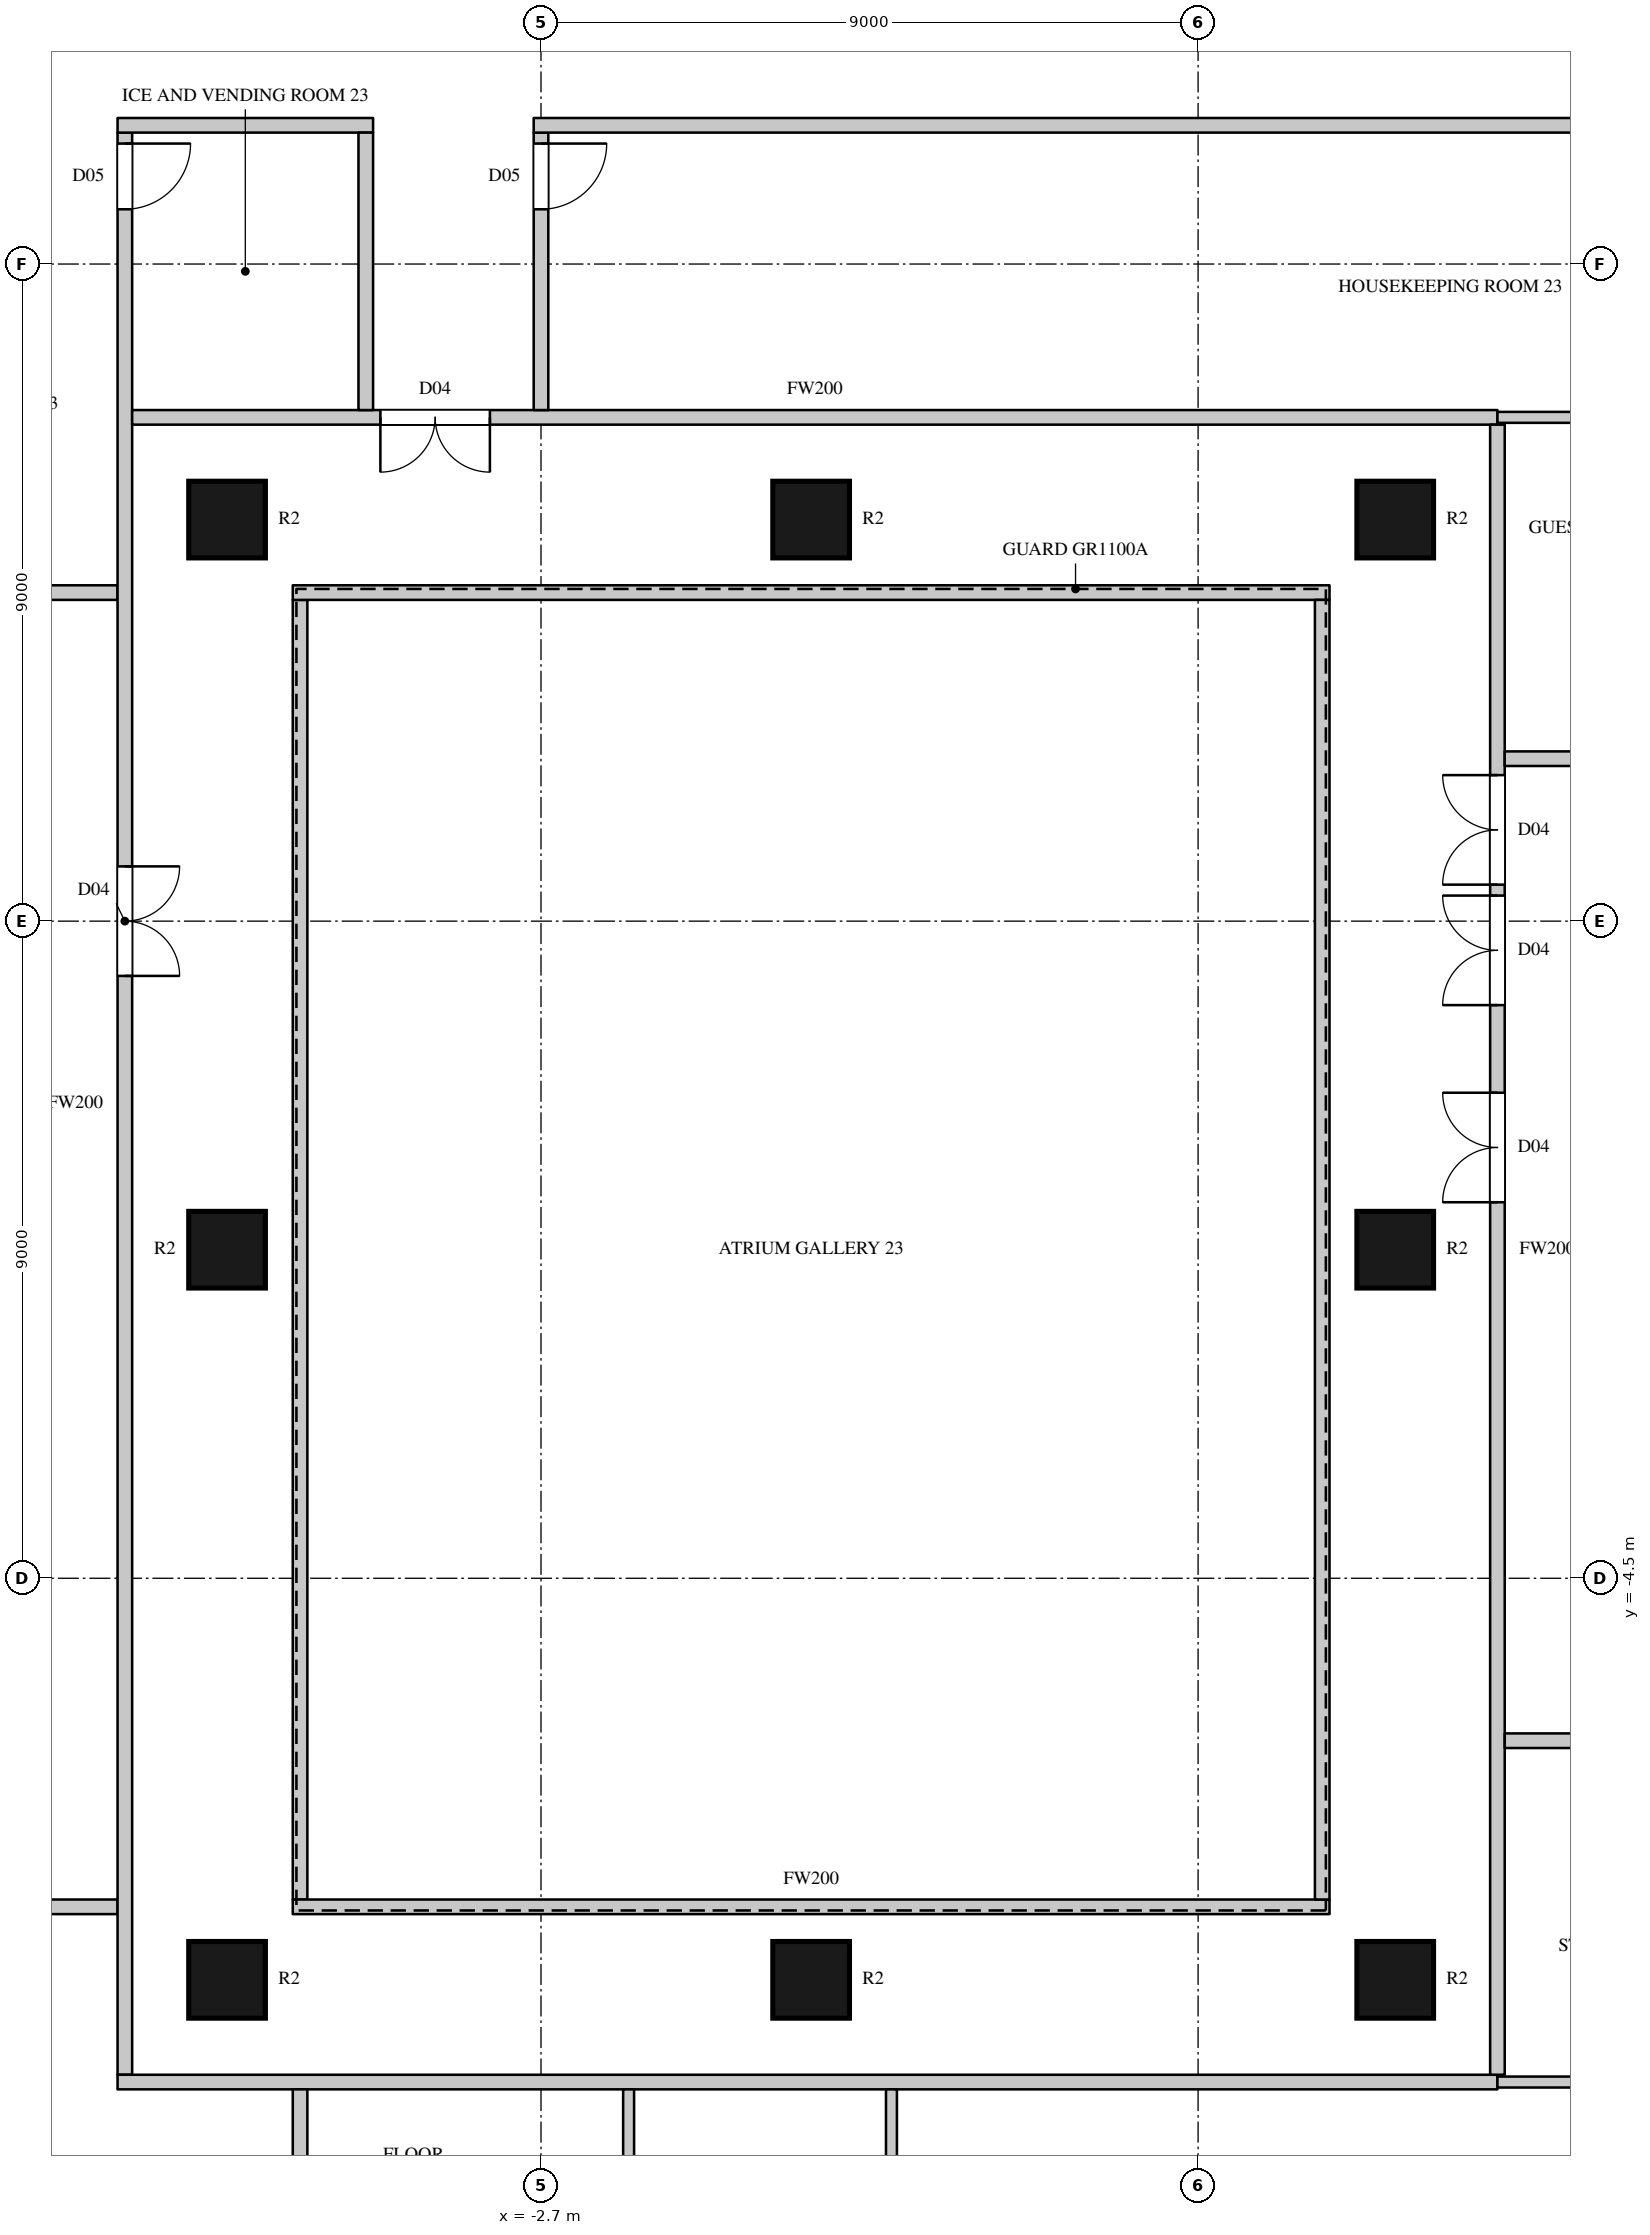
"""IFC4 building model, lengths in metres.
Left out: names, types, materials, properties, quantities, classifications, styles, units other than length and angle.
Written with IfcOpenShell. Run it as: python <this file> out.ifc"""

import sys

from ifc_helpers import new_model, si_unit, direction, frame, frame_2d, origin, origin_2d, place, context, subcontext, project, spatial, rectangle, circle, extrude, element, fill, save


model = new_model("IFC4")
c1 = context("Model", 3, precision=1e-05, world=origin(), true_north=direction((0.0, 1.0)))
c2 = subcontext(c1, "Body", "Model", "MODEL_VIEW")
j1 = project(units=[si_unit("LENGTHUNIT", "METRE"), si_unit("PLANEANGLEUNIT", "RADIAN")], contexts=[c1])
p1 = place(None, origin())
s1 = spatial("IfcSite", under=j1, at=p1, CompositionType="ELEMENT")
p2 = place(p1, origin())
s2 = spatial("IfcBuilding", under=s1, at=p2, CompositionType="ELEMENT")
p3 = place(p2, frame((0.0, 0.0, 113.1)))
s3 = spatial("IfcBuildingStorey", under=s2, at=p3, CompositionType="ELEMENT", Elevation=113.1)
for number, where, z_axis, x_axis in (
    (1, (-7.0, -10.0, 0.0), (0.0, 0.0, 1.0), (1.0, 0.0, 0.0)),
    (2, (-7.0, 0.0, 0.0), (0.0, 0.0, 1.0), (1.0, 0.0, 0.0)),
    (3, (-7.0, 10.0, 0.0), (0.0, 0.0, 1.0), (1.0, 0.0, 0.0)),
    (4, (1.0, -10.0, 0.0), (0.0, 0.0, 1.0), (1.0, 0.0, 0.0)),
    (5, (1.0, 10.0, 0.0), (0.0, 0.0, 1.0), (1.0, 0.0, 0.0)),
    (6, (9.0, -10.0, 0.0), (0.0, 0.0, 1.0), (1.0, 0.0, 0.0)),
    (7, (9.0, 0.0, 0.0), (0.0, 0.0, 1.0), (1.0, 0.0, 0.0)),
    (8, (9.0, 10.0, 0.0), (0.0, 0.0, 1.0), (1.0, 0.0, 0.0)),
):
    element("IfcColumn", number, at=place(p3, frame(where, z_axis=z_axis, x_axis=x_axis)), inside=s3, PredefinedType="COLUMN", context=c2, shape_type="SweptSolid", body=[
        extrude(circle(Radius=0.525, at=origin_2d()), origin(), (0.0, 0.0, 1.0), 3.6),
    ])
p4 = place(p3, frame((-13.97, -9.0, 0.0), z_axis=(0.0, 0.0, 1.0), x_axis=(1.0, 0.0, 0.0)))
e9 = element("IfcWall", 9, at=p4, inside=s3, PredefinedType="PARTITIONING", context=c2, shape_type="SweptSolid", body=[
    extrude(rectangle(XDim=5.47, YDim=0.2, at=frame_2d((2.735, 0.0))), origin(), (0.0, 0.0, 1.0), 3.3),
])
p5 = place(p4, frame((0.4, 0.0, 0.0)))
e10 = element("IfcOpeningElement", 10, at=p5, cuts=e9, PredefinedType="OPENING", context=c2, shape_type="SweptSolid", body=[
    extrude(rectangle(XDim=1.5, YDim=2.2, at=frame_2d((0.75, 1.1))), frame((0.0, 0.11, 0.0), z_axis=(0.0, -1.0, 0.0), x_axis=(1.0, 0.0, 0.0)), (0.0, 0.0, 1.0), 0.22),
])
p6 = place(p4, frame((2.05, 0.0, 0.0)))
e11 = element("IfcOpeningElement", 11, at=p6, cuts=e9, PredefinedType="OPENING", context=c2, shape_type="SweptSolid", body=[
    extrude(rectangle(XDim=1.5, YDim=2.2, at=frame_2d((0.75, 1.1))), frame((0.0, 0.11, 0.0), z_axis=(0.0, -1.0, 0.0), x_axis=(1.0, 0.0, 0.0)), (0.0, 0.0, 1.0), 0.22),
])
p7 = place(p3, frame((-13.97, 9.0, 0.0), z_axis=(0.0, 0.0, 1.0), x_axis=(1.0, 0.0, 0.0)))
e12 = element("IfcWall", 12, at=p7, inside=s3, PredefinedType="PARTITIONING", context=c2, shape_type="SweptSolid", body=[
    extrude(rectangle(XDim=5.47, YDim=0.2, at=frame_2d((2.735, 0.0))), origin(), (0.0, 0.0, 1.0), 3.3),
])
p8 = place(p3, frame((-8.4, -11.3, 0.0), z_axis=(0.0, 0.0, 1.0), x_axis=(0.0, 1.0, 0.0)))
e13 = element("IfcWall", 13, at=p8, inside=s3, PredefinedType="PARTITIONING", context=c2, shape_type="SweptSolid", body=[
    extrude(rectangle(XDim=26.6, YDim=0.2, at=frame_2d((13.3, 0.0))), origin(), (0.0, 0.0, 1.0), 3.3),
])
p9 = place(p8, frame((15.05, 0.0, 0.0)))
e14 = element("IfcOpeningElement", 14, at=p9, cuts=e13, PredefinedType="OPENING", context=c2, shape_type="SweptSolid", body=[
    extrude(rectangle(XDim=1.5, YDim=2.2, at=frame_2d((0.75, 1.1))), frame((0.0, 0.11, 0.0), z_axis=(0.0, -1.0, 0.0), x_axis=(1.0, 0.0, 0.0)), (0.0, 0.0, 1.0), 0.22),
])
p10 = place(p8, frame((25.55, 0.0, 0.0)))
e15 = element("IfcOpeningElement", 15, at=p10, cuts=e13, PredefinedType="OPENING", context=c2, shape_type="SweptSolid", body=[
    extrude(rectangle(XDim=0.9, YDim=2.2, at=frame_2d((0.45, 1.1))), frame((0.0, 0.11, 0.0), z_axis=(0.0, -1.0, 0.0), x_axis=(1.0, 0.0, 0.0)), (0.0, 0.0, 1.0), 0.22),
])
p11 = place(p3, frame((-8.5, -11.4, 0.0), z_axis=(0.0, 0.0, 1.0), x_axis=(1.0, 0.0, 0.0)))
e16 = element("IfcWall", 16, at=p11, inside=s3, PredefinedType="PARTITIONING", context=c2, shape_type="SweptSolid", body=[
    extrude(rectangle(XDim=18.9, YDim=0.2, at=frame_2d((9.45, 0.0))), origin(), (0.0, 0.0, 1.0), 3.3),
])
p12 = place(p3, frame((-8.3, 11.4, 0.0), z_axis=(0.0, 0.0, 1.0), x_axis=(1.0, 0.0, 0.0)))
e17 = element("IfcWall", 17, at=p12, inside=s3, PredefinedType="PARTITIONING", context=c2, shape_type="SweptSolid", body=[
    extrude(rectangle(XDim=18.7, YDim=0.2, at=frame_2d((9.35, 0.0))), origin(), (0.0, 0.0, 1.0), 3.3),
])
p13 = place(p12, frame((3.4, 0.0, 0.0)))
e18 = element("IfcOpeningElement", 18, at=p13, cuts=e17, PredefinedType="OPENING", context=c2, shape_type="SweptSolid", body=[
    extrude(rectangle(XDim=1.5, YDim=2.2, at=frame_2d((0.75, 1.1))), frame((0.0, 0.11, 0.0), z_axis=(0.0, -1.0, 0.0), x_axis=(1.0, 0.0, 0.0)), (0.0, 0.0, 1.0), 0.22),
])
p14 = place(p3, frame((-8.5, 15.4, 0.0), z_axis=(0.0, 0.0, 1.0), x_axis=(1.0, 0.0, 0.0)))
e19 = element("IfcWall", 19, at=p14, inside=s3, PredefinedType="PARTITIONING", context=c2, shape_type="SweptSolid", body=[
    extrude(rectangle(XDim=3.5, YDim=0.2, at=frame_2d((1.75, 0.0))), origin(), (0.0, 0.0, 1.0), 3.3),
])
p15 = place(p3, frame((-6.0, -15.3, 0.0), z_axis=(0.0, 0.0, 1.0), x_axis=(0.0, 1.0, 0.0)))
e20 = element("IfcWall", 20, at=p15, inside=s3, PredefinedType="PARTITIONING", context=c2, shape_type="SweptSolid", body=[
    extrude(rectangle(XDim=3.8, YDim=0.2, at=frame_2d((1.9, 0.0))), origin(), (0.0, 0.0, 1.0), 3.3),
])
p16 = place(p15, frame((0.15, 0.0, 0.0)))
e21 = element("IfcOpeningElement", 21, at=p16, cuts=e20, PredefinedType="OPENING", context=c2, shape_type="SweptSolid", body=[
    extrude(rectangle(XDim=0.95, YDim=2.2, at=frame_2d((0.475, 1.1))), frame((0.0, 0.11, 0.0), z_axis=(0.0, -1.0, 0.0), x_axis=(1.0, 0.0, 0.0)), (0.0, 0.0, 1.0), 0.22),
])
p17 = place(p3, frame((-6.0, -8.9, 0.0), z_axis=(0.0, 0.0, 1.0), x_axis=(0.0, 1.0, 0.0)))
e22 = element("IfcWall", 22, at=p17, inside=s3, PredefinedType="PARTITIONING", context=c2, shape_type="SweptSolid", body=[
    extrude(rectangle(XDim=17.8, YDim=0.2, at=frame_2d((8.9, 0.0))), origin(), (0.0, 0.0, 1.0), 3.3),
])
for number, where, z_axis, x_axis in (
    (23, (-6.1, -9.0, 0.0), (0.0, 0.0, 1.0), (1.0, 0.0, 0.0)),
    (24, (-6.1, 9.0, 0.0), (0.0, 0.0, 1.0), (1.0, 0.0, 0.0)),
):
    element("IfcWall", number, at=place(p3, frame(where, z_axis=z_axis, x_axis=x_axis)), inside=s3, PredefinedType="PARTITIONING", context=c2, shape_type="SweptSolid", body=[
        extrude(rectangle(XDim=14.2, YDim=0.2, at=frame_2d((7.1, 0.0))), origin(), (0.0, 0.0, 1.0), 3.3),
    ])
p18 = place(p3, frame((-5.1, 11.5, 0.0), z_axis=(0.0, 0.0, 1.0), x_axis=(0.0, 1.0, 0.0)))
e25 = element("IfcWall", 25, at=p18, inside=s3, PredefinedType="PARTITIONING", context=c2, shape_type="SweptSolid", body=[
    extrude(rectangle(XDim=3.8, YDim=0.2, at=frame_2d((1.9, 0.0))), origin(), (0.0, 0.0, 1.0), 3.3),
])
p19 = place(p3, frame((-2.7, 11.5, 0.0), z_axis=(0.0, 0.0, 1.0), x_axis=(0.0, 1.0, 0.0)))
e26 = element("IfcWall", 26, at=p19, inside=s3, PredefinedType="PARTITIONING", context=c2, shape_type="SweptSolid", body=[
    extrude(rectangle(XDim=3.8, YDim=0.2, at=frame_2d((1.9, 0.0))), origin(), (0.0, 0.0, 1.0), 2.75),
])
p20 = place(p19, frame((2.75, 0.0, 0.0)))
e27 = element("IfcOpeningElement", 27, at=p20, cuts=e26, PredefinedType="OPENING", context=c2, shape_type="SweptSolid", body=[
    extrude(rectangle(XDim=0.9, YDim=2.2, at=frame_2d((0.45, 1.1))), frame((0.0, 0.11, 0.0), z_axis=(0.0, -1.0, 0.0), x_axis=(1.0, 0.0, 0.0)), (0.0, 0.0, 1.0), 0.22),
])
p21 = place(p3, frame((-2.8, 15.4, 0.0), z_axis=(0.0, 0.0, 1.0), x_axis=(1.0, 0.0, 0.0)))
e28 = element("IfcWall", 28, at=p21, inside=s3, PredefinedType="PARTITIONING", context=c2, shape_type="SweptSolid", body=[
    extrude(rectangle(XDim=16.9, YDim=0.2, at=frame_2d((8.45, 0.0))), origin(), (0.0, 0.0, 1.0), 3.3),
])
p22 = place(p3, frame((8.0, -8.9, 0.0), z_axis=(0.0, 0.0, 1.0), x_axis=(0.0, 1.0, 0.0)))
e29 = element("IfcWall", 29, at=p22, inside=s3, PredefinedType="PARTITIONING", context=c2, shape_type="SweptSolid", body=[
    extrude(rectangle(XDim=17.8, YDim=0.2, at=frame_2d((8.9, 0.0))), origin(), (0.0, 0.0, 1.0), 3.3),
])
p23 = place(p3, frame((10.4, -11.3, 0.0), z_axis=(0.0, 0.0, 1.0), x_axis=(0.0, 1.0, 0.0)))
e30 = element("IfcWall", 30, at=p23, inside=s3, PredefinedType="PARTITIONING", context=c2, shape_type="SweptSolid", body=[
    extrude(rectangle(XDim=22.6, YDim=0.2, at=frame_2d((11.3, 0.0))), origin(), (0.0, 0.0, 1.0), 3.3),
])
p24 = place(p23, frame((16.3, 0.0, 0.0)))
e31 = element("IfcOpeningElement", 31, at=p24, cuts=e30, PredefinedType="OPENING", context=c2, shape_type="SweptSolid", body=[
    extrude(rectangle(XDim=1.5, YDim=2.2, at=frame_2d((0.75, 1.1))), frame((0.0, 0.11, 0.0), z_axis=(0.0, -1.0, 0.0), x_axis=(1.0, 0.0, 0.0)), (0.0, 0.0, 1.0), 0.22),
])
p25 = place(p23, frame((14.65, 0.0, 0.0)))
e32 = element("IfcOpeningElement", 32, at=p25, cuts=e30, PredefinedType="OPENING", context=c2, shape_type="SweptSolid", body=[
    extrude(rectangle(XDim=1.5, YDim=2.2, at=frame_2d((0.75, 1.1))), frame((0.0, 0.11, 0.0), z_axis=(0.0, -1.0, 0.0), x_axis=(1.0, 0.0, 0.0)), (0.0, 0.0, 1.0), 0.22),
])
p26 = place(p23, frame((11.95, 0.0, 0.0)))
e33 = element("IfcOpeningElement", 33, at=p26, cuts=e30, PredefinedType="OPENING", context=c2, shape_type="SweptSolid", body=[
    extrude(rectangle(XDim=1.5, YDim=2.2, at=frame_2d((0.75, 1.1))), frame((0.0, 0.11, 0.0), z_axis=(0.0, -1.0, 0.0), x_axis=(1.0, 0.0, 0.0)), (0.0, 0.0, 1.0), 0.22),
])
p27 = place(p3, frame((10.5, -6.725, 0.0), z_axis=(0.0, 0.0, 1.0), x_axis=(1.0, 0.0, 0.0)))
e34 = element("IfcWall", 34, at=p27, inside=s3, PredefinedType="PARTITIONING", context=c2, shape_type="SweptSolid", body=[
    extrude(rectangle(XDim=3.6, YDim=0.2, at=frame_2d((1.8, 0.0))), origin(), (0.0, 0.0, 1.0), 3.3),
])
p28 = place(p27, frame((2.3, 0.0, 0.0)))
e35 = element("IfcOpeningElement", 35, at=p28, cuts=e34, PredefinedType="OPENING", context=c2, shape_type="SweptSolid", body=[
    extrude(rectangle(XDim=0.95, YDim=2.2, at=frame_2d((0.475, 1.1))), frame((0.0, 0.11, 0.0), z_axis=(0.0, -1.0, 0.0), x_axis=(1.0, 0.0, 0.0)), (0.0, 0.0, 1.0), 0.22),
])
p29 = place(p3, frame((10.5, 6.725, 0.0), z_axis=(0.0, 0.0, 1.0), x_axis=(1.0, 0.0, 0.0)))
e36 = element("IfcWall", 36, at=p29, inside=s3, PredefinedType="PARTITIONING", context=c2, shape_type="SweptSolid", body=[
    extrude(rectangle(XDim=3.6, YDim=0.2, at=frame_2d((1.8, 0.0))), origin(), (0.0, 0.0, 1.0), 3.3),
])
p30 = place(p29, frame((1.65, 0.0, 0.0)))
e37 = element("IfcOpeningElement", 37, at=p30, cuts=e36, PredefinedType="OPENING", context=c2, shape_type="SweptSolid", body=[
    extrude(rectangle(XDim=1.6, YDim=2.4, at=frame_2d((0.8, 1.2))), frame((0.0, 0.11, 0.0), z_axis=(0.0, -1.0, 0.0), x_axis=(1.0, 0.0, 0.0)), (0.0, 0.0, 1.0), 0.22),
])
for number, where, z_axis, x_axis in (
    (38, (-1.5, -15.3, 0.0), (0.0, 0.0, 1.0), (0.0, 1.0, 0.0)),
    (39, (2.1, -15.3, 0.0), (0.0, 0.0, 1.0), (0.0, 1.0, 0.0)),
):
    element("IfcWall", number, at=place(p3, frame(where, z_axis=z_axis, x_axis=x_axis)), inside=s3, PredefinedType="PARTITIONING", context=c2, shape_type="SweptSolid", body=[
        extrude(rectangle(XDim=3.8, YDim=0.15, at=frame_2d((1.9, 0.0))), origin(), (0.0, 0.0, 1.0), 3.3),
    ])
for number, where, z_axis, x_axis in (
    (40, (10.4, -11.4, 0.0), (0.0, 0.0, 1.0), (1.0, 0.0, 0.0)),
    (41, (10.4, 11.4, 0.0), (0.0, 0.0, 1.0), (1.0, 0.0, 0.0)),
):
    element("IfcWall", number, at=place(p3, frame(where, z_axis=z_axis, x_axis=x_axis)), inside=s3, PredefinedType="PARTITIONING", context=c2, shape_type="SweptSolid", body=[
        extrude(rectangle(XDim=3.5, YDim=0.15, at=frame_2d((1.75, 0.0))), origin(), (0.0, 0.0, 1.0), 3.3),
    ])
p31 = place(p9, origin())
e42 = element("IfcDoor", 42, at=p31, inside=s3, OperationType="DOUBLE_DOOR_SINGLE_SWING", PredefinedType="DOOR", context=c2, shape_type="SweptSolid", body=[
    extrude(rectangle(XDim=1.5, YDim=2.2, at=frame_2d((0.75, 1.1))), frame((0.0, 0.025, 0.0), z_axis=(0.0, -1.0, 0.0), x_axis=(1.0, 0.0, 0.0)), (0.0, 0.0, 1.0), 0.05),
])
fill(e14, e42)
p32 = place(p13, origin())
e43 = element("IfcDoor", 43, at=p32, inside=s3, OperationType="DOUBLE_DOOR_SINGLE_SWING", PredefinedType="DOOR", context=c2, shape_type="SweptSolid", body=[
    extrude(rectangle(XDim=1.5, YDim=2.2, at=frame_2d((0.75, 1.1))), frame((0.0, 0.025, 0.0), z_axis=(0.0, -1.0, 0.0), x_axis=(1.0, 0.0, 0.0)), (0.0, 0.0, 1.0), 0.05),
])
fill(e18, e43)
p33 = place(p24, origin())
e44 = element("IfcDoor", 44, at=p33, inside=s3, OperationType="DOUBLE_DOOR_SINGLE_SWING", PredefinedType="DOOR", context=c2, shape_type="SweptSolid", body=[
    extrude(rectangle(XDim=1.5, YDim=2.2, at=frame_2d((0.75, 1.1))), frame((0.0, 0.025, 0.0), z_axis=(0.0, -1.0, 0.0), x_axis=(1.0, 0.0, 0.0)), (0.0, 0.0, 1.0), 0.05),
])
fill(e31, e44)
p34 = place(p25, origin())
e45 = element("IfcDoor", 45, at=p34, inside=s3, OperationType="DOUBLE_DOOR_SINGLE_SWING", PredefinedType="DOOR", context=c2, shape_type="SweptSolid", body=[
    extrude(rectangle(XDim=1.5, YDim=2.2, at=frame_2d((0.75, 1.1))), frame((0.0, 0.025, 0.0), z_axis=(0.0, -1.0, 0.0), x_axis=(1.0, 0.0, 0.0)), (0.0, 0.0, 1.0), 0.05),
])
fill(e32, e45)
p35 = place(p26, origin())
e46 = element("IfcDoor", 46, at=p35, inside=s3, OperationType="DOUBLE_DOOR_SINGLE_SWING", PredefinedType="DOOR", context=c2, shape_type="SweptSolid", body=[
    extrude(rectangle(XDim=1.5, YDim=2.2, at=frame_2d((0.75, 1.1))), frame((0.0, 0.025, 0.0), z_axis=(0.0, -1.0, 0.0), x_axis=(1.0, 0.0, 0.0)), (0.0, 0.0, 1.0), 0.05),
])
fill(e33, e46)
p36 = place(p10, origin())
e47 = element("IfcDoor", 47, at=p36, inside=s3, OperationType="SINGLE_SWING_LEFT", PredefinedType="DOOR", context=c2, shape_type="SweptSolid", body=[
    extrude(rectangle(XDim=0.9, YDim=2.2, at=frame_2d((0.45, 1.1))), frame((0.0, 0.025, 0.0), z_axis=(0.0, -1.0, 0.0), x_axis=(1.0, 0.0, 0.0)), (0.0, 0.0, 1.0), 0.05),
])
fill(e15, e47)
p37 = place(p20, origin())
e48 = element("IfcDoor", 48, at=p37, inside=s3, OperationType="SINGLE_SWING_LEFT", PredefinedType="DOOR", context=c2, shape_type="SweptSolid", body=[
    extrude(rectangle(XDim=0.9, YDim=2.2, at=frame_2d((0.45, 1.1))), frame((0.0, 0.025, 0.0), z_axis=(0.0, -1.0, 0.0), x_axis=(1.0, 0.0, 0.0)), (0.0, 0.0, 1.0), 0.05),
])
fill(e27, e48)
save(model, sys.argv[1])
